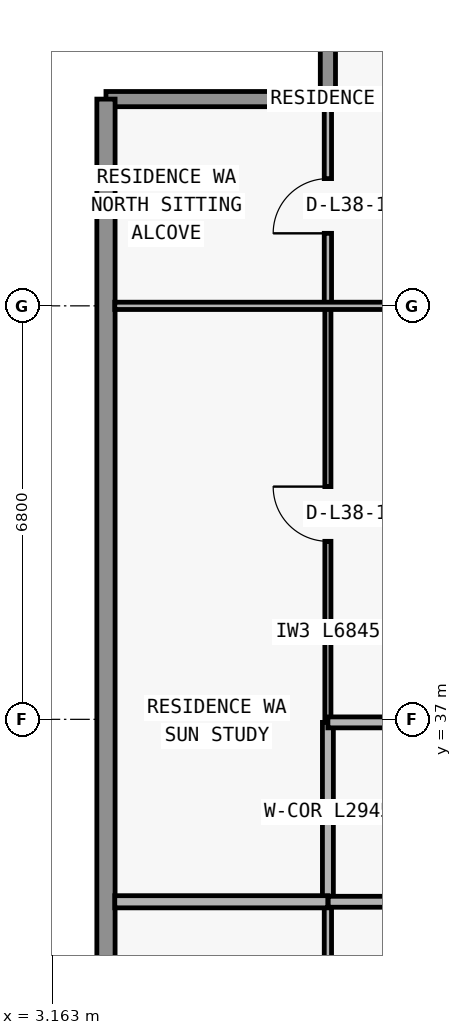
"""IFC4 building model, lengths in metres.
Left out: names, types, materials, properties, quantities, classifications, styles, units other than length and angle.
Written with IfcOpenShell. Run it as: python <this file> out.ifc"""

import sys

from ifc_helpers import new_model, si_unit, direction, frame, frame_2d, origin, place, context, subcontext, project, spatial, rectangle, extrude, element, fill, save


model = new_model("IFC4")
c1 = context("Model", 3, precision=1e-05, world=origin(), true_north=direction((0.0, 1.0)))
c2 = subcontext(c1, "Body", "Model", "MODEL_VIEW")
j1 = project(units=[si_unit("LENGTHUNIT", "METRE"), si_unit("PLANEANGLEUNIT", "RADIAN")], contexts=[c1])
p1 = place(None, origin())
s1 = spatial("IfcSite", under=j1, at=p1, CompositionType="ELEMENT")
p2 = place(p1, origin())
s2 = spatial("IfcBuilding", under=s1, at=p2, CompositionType="ELEMENT")
p3 = place(p2, frame((0.0, 0.0, 138.9)))
s3 = spatial("IfcBuildingStorey", under=s2, at=p3, CompositionType="ELEMENT", Elevation=138.9)
p4 = place(p3, frame((4.05, 47.2, 0.0), z_axis=(0.0, 0.0, 1.0), x_axis=(1.0, 0.0, 0.0)))
e1 = element("IfcWall", 1, at=p4, inside=s3, PredefinedType="ELEMENTEDWALL", context=c2, shape_type="SweptSolid", body=[
    extrude(rectangle(XDim=3.65, YDim=0.25, at=frame_2d((1.825, 0.0))), origin(), (0.0, 0.0, 1.0), 3.05),
])
p5 = place(p3, frame((7.7, 47.2, 0.0), z_axis=(0.0, 0.0, 1.0), x_axis=(0.0, 1.0, 0.0)))
e2 = element("IfcWall", 2, at=p5, inside=s3, PredefinedType="ELEMENTEDWALL", context=c2, shape_type="SweptSolid", body=[
    extrude(rectangle(XDim=3.25, YDim=0.25, at=frame_2d((1.625, 0.0))), origin(), (0.0, 0.0, 1.0), 3.05),
])
p6 = place(p3, frame((4.05, 28.0, 0.0), z_axis=(0.0, 0.0, 1.0), x_axis=(0.0, 1.0, 0.0)))
e3 = element("IfcWall", 3, at=p6, inside=s3, PredefinedType="STANDARD", context=c2, shape_type="SweptSolid", body=[
    extrude(rectangle(XDim=19.2, YDim=0.3, at=frame_2d((9.6, 0.0))), origin(), (0.0, 0.0, 1.0), 3.05),
])
p7 = place(p3, frame((7.7, 28.84, 0.0), z_axis=(0.0, 0.0, 1.0), x_axis=(0.0, 1.0, 0.0)))
e4 = element("IfcWall", 4, at=p7, inside=s3, PredefinedType="PARTITIONING", context=c2, shape_type="SweptSolid", body=[
    extrude(rectangle(XDim=5.16, YDim=0.12, at=frame_2d((2.58, 0.0))), origin(), (0.0, 0.0, 1.0), 3.05),
])
p8 = place(p3, frame((7.7, 34.005, 0.0), z_axis=(0.0, 0.0, 1.0), x_axis=(0.0, 1.0, 0.0)))
e5 = element("IfcWall", 5, at=p8, inside=s3, PredefinedType="PARTITIONING", context=c2, shape_type="SweptSolid", body=[
    extrude(rectangle(XDim=2.945, YDim=0.18, at=frame_2d((1.473, 0.0))), origin(), (0.0, 0.0, 1.0), 3.05),
])
p9 = place(p3, frame((7.7, 36.955, 0.0), z_axis=(0.0, 0.0, 1.0), x_axis=(0.0, 1.0, 0.0)))
e6 = element("IfcWall", 6, at=p9, inside=s3, PredefinedType="MOVABLE", context=c2, shape_type="SweptSolid", body=[
    extrude(rectangle(XDim=6.845, YDim=0.1, at=frame_2d((3.422, 0.0))), origin(), (0.0, 0.0, 1.0), 3.05),
])
p10 = place(p9, frame((2.972, 0.0, 0.0)))
e7 = element("IfcOpeningElement", 7, at=p10, cuts=e6, PredefinedType="OPENING", context=c2, shape_type="SweptSolid", body=[
    extrude(rectangle(XDim=0.9, YDim=2.15, at=frame_2d((0.45, 1.075))), frame((0.0, 0.06, 0.0), z_axis=(0.0, -1.0, 0.0), x_axis=(1.0, 0.0, 0.0)), (0.0, 0.0, 1.0), 0.12),
])
p11 = place(p3, frame((7.7, 43.805, 0.0), z_axis=(0.0, 0.0, 1.0), x_axis=(0.0, 1.0, 0.0)))
e8 = element("IfcWall", 8, at=p11, inside=s3, PredefinedType="PARTITIONING", context=c2, shape_type="SweptSolid", body=[
    extrude(rectangle(XDim=3.275, YDim=0.12, at=frame_2d((1.638, 0.0))), origin(), (0.0, 0.0, 1.0), 3.05),
])
p12 = place(p11, frame((1.188, 0.0, 0.0)))
e9 = element("IfcOpeningElement", 9, at=p12, cuts=e8, PredefinedType="OPENING", context=c2, shape_type="SweptSolid", body=[
    extrude(rectangle(XDim=0.9, YDim=2.15, at=frame_2d((0.45, 1.075))), frame((0.0, 0.07, 0.0), z_axis=(0.0, -1.0, 0.0), x_axis=(1.0, 0.0, 0.0)), (0.0, 0.0, 1.0), 0.14),
])
p13 = place(p3, frame((4.195, 34.0, 0.0), z_axis=(0.0, 0.0, 1.0), x_axis=(1.0, 0.0, 0.0)))
e10 = element("IfcWall", 10, at=p13, inside=s3, PredefinedType="PARTITIONING", context=c2, shape_type="SweptSolid", body=[
    extrude(rectangle(XDim=3.505, YDim=0.2, at=frame_2d((1.752, 0.0))), origin(), (0.0, 0.0, 1.0), 3.05),
])
p14 = place(p3, frame((7.705, 34.0, 0.0), z_axis=(0.0, 0.0, 1.0), x_axis=(1.0, 0.0, 0.0)))
e11 = element("IfcWall", 11, at=p14, inside=s3, PredefinedType="PARTITIONING", context=c2, shape_type="SweptSolid", body=[
    extrude(rectangle(XDim=10.545, YDim=0.18, at=frame_2d((5.272, 0.0))), origin(), (0.0, 0.0, 1.0), 3.05),
])
p15 = place(p14, frame((4.979, 0.0, 0.0)))
e12 = element("IfcOpeningElement", 12, at=p15, cuts=e11, PredefinedType="OPENING", context=c2, shape_type="SweptSolid", body=[
    extrude(rectangle(XDim=1.0, YDim=2.2, at=frame_2d((0.5, 1.1))), frame((0.0, 0.1, 0.0), z_axis=(0.0, -1.0, 0.0), x_axis=(1.0, 0.0, 0.0)), (0.0, 0.0, 1.0), 0.2),
])
p16 = place(p3, frame((7.7, 36.95, 0.0), z_axis=(0.0, 0.0, 1.0), x_axis=(1.0, 0.0, 0.0)))
e13 = element("IfcWall", 13, at=p16, inside=s3, PredefinedType="PARTITIONING", context=c2, shape_type="SweptSolid", body=[
    extrude(rectangle(XDim=10.145, YDim=0.18, at=frame_2d((5.073, 0.0))), origin(), (0.0, 0.0, 1.0), 3.05),
])
p17 = place(p16, frame((5.188, 0.0, 0.0)))
e14 = element("IfcOpeningElement", 14, at=p17, cuts=e13, PredefinedType="OPENING", context=c2, shape_type="SweptSolid", body=[
    extrude(rectangle(XDim=1.0, YDim=2.2, at=frame_2d((0.5, 1.1))), frame((0.0, 0.1, 0.0), z_axis=(0.0, -1.0, 0.0), x_axis=(1.0, 0.0, 0.0)), (0.0, 0.0, 1.0), 0.2),
])
p18 = place(p3, frame((4.195, 43.8, 0.0), z_axis=(0.0, 0.0, 1.0), x_axis=(1.0, 0.0, 0.0)))
e15 = element("IfcWall", 15, at=p18, inside=s3, PredefinedType="PARTITIONING", context=c2, shape_type="SweptSolid", body=[
    extrude(rectangle(XDim=13.66, YDim=0.12, at=frame_2d((6.83, 0.0))), origin(), (0.0, 0.0, 1.0), 2.339),
])
p19 = place(p18, frame((8.743, 0.0, 0.0)))
e16 = element("IfcOpeningElement", 16, at=p19, cuts=e15, PredefinedType="OPENING", context=c2, shape_type="SweptSolid", body=[
    extrude(rectangle(XDim=0.9, YDim=2.15, at=frame_2d((0.45, 1.075))), frame((0.0, 0.07, 0.0), z_axis=(0.0, -1.0, 0.0), x_axis=(1.0, 0.0, 0.0)), (0.0, 0.0, 1.0), 0.14),
])
p20 = place(p18, frame((12.107, 0.0, 0.0)))
e17 = element("IfcOpeningElement", 17, at=p20, cuts=e15, PredefinedType="OPENING", context=c2, shape_type="SweptSolid", body=[
    extrude(rectangle(XDim=0.85, YDim=2.1, at=frame_2d((0.425, 1.05))), frame((0.0, 0.07, 0.0), z_axis=(0.0, -1.0, 0.0), x_axis=(1.0, 0.0, 0.0)), (0.0, 0.0, 1.0), 0.14),
])
p21 = place(p10, origin())
e18 = element("IfcDoor", 18, at=p21, inside=s3, OperationType="SINGLE_SWING_RIGHT", PredefinedType="DOOR", context=c2, shape_type="SweptSolid", body=[
    extrude(rectangle(XDim=0.9, YDim=2.15, at=frame_2d((0.45, 1.075))), frame((0.0, 0.025, 0.0), z_axis=(0.0, -1.0, 0.0), x_axis=(1.0, 0.0, 0.0)), (0.0, 0.0, 1.0), 0.05),
])
fill(e7, e18)
p22 = place(p12, origin())
e19 = element("IfcDoor", 19, at=p22, inside=s3, OperationType="SINGLE_SWING_LEFT", PredefinedType="DOOR", context=c2, shape_type="SweptSolid", body=[
    extrude(rectangle(XDim=0.9, YDim=2.15, at=frame_2d((0.45, 1.075))), frame((0.0, 0.025, 0.0), z_axis=(0.0, -1.0, 0.0), x_axis=(1.0, 0.0, 0.0)), (0.0, 0.0, 1.0), 0.05),
])
fill(e9, e19)
save(model, sys.argv[1])
